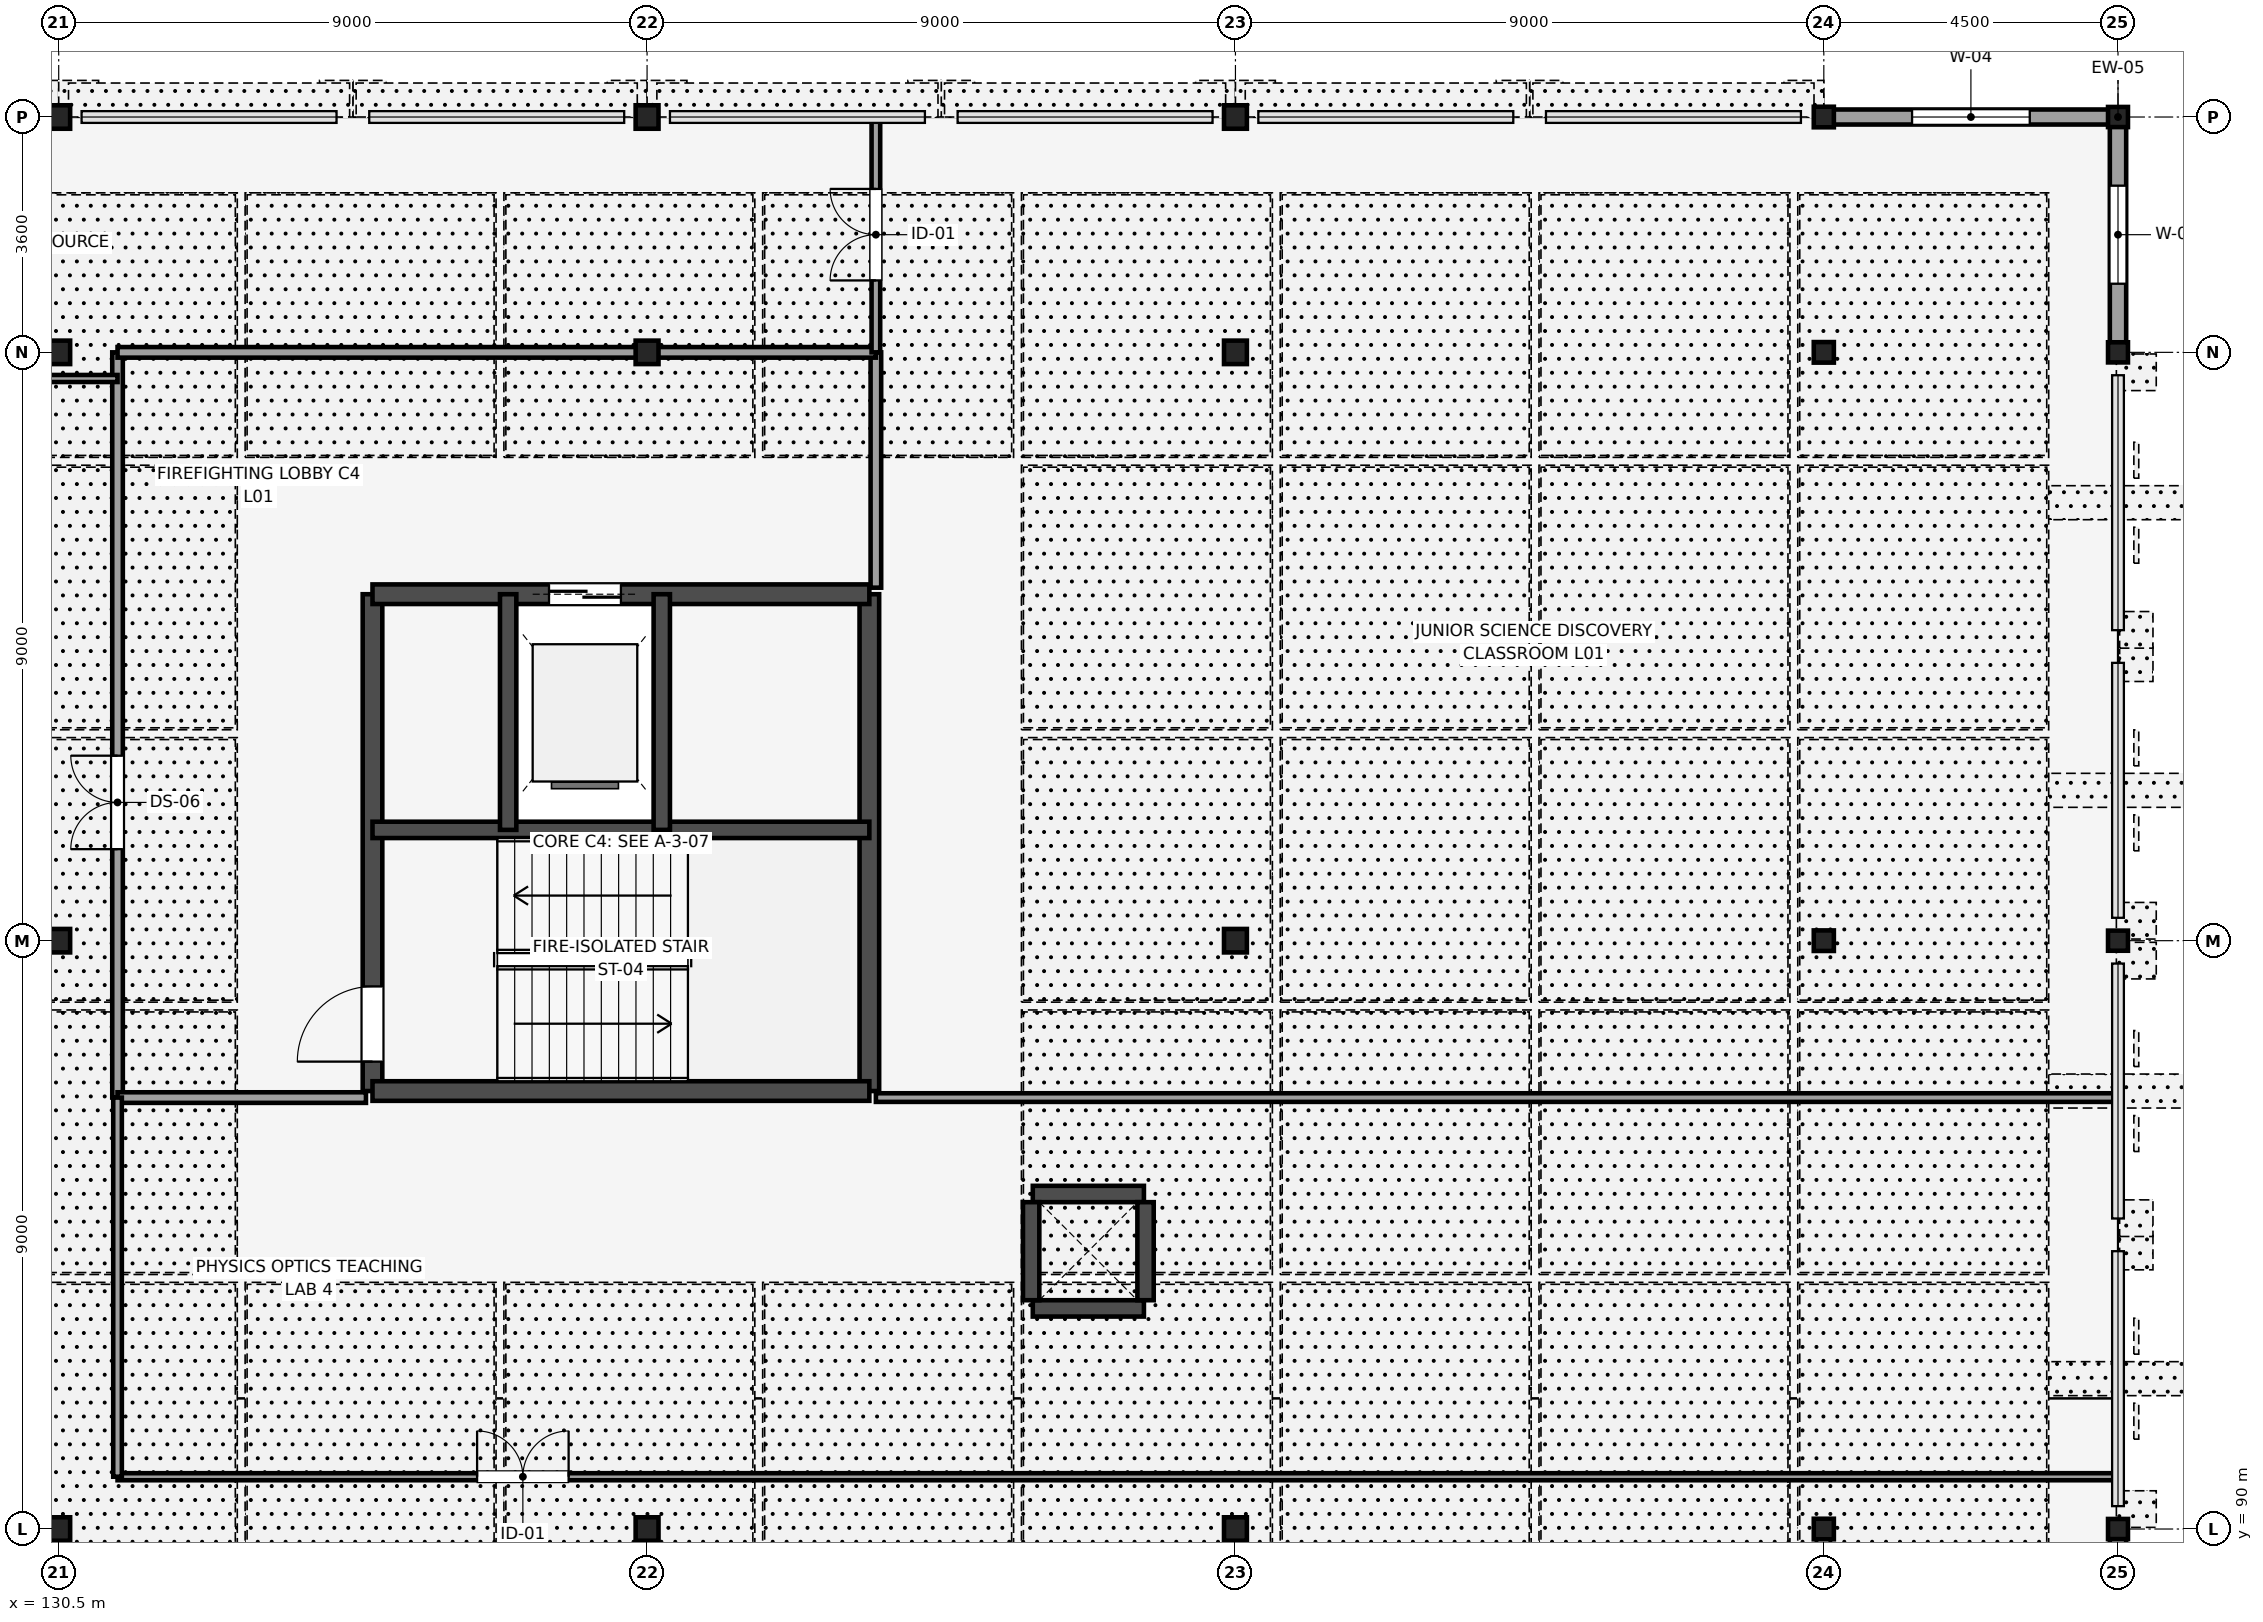
"""IFC4 building model, lengths in metres.
Left out: names, types, materials, properties, quantities, classifications, styles, units other than length and angle.
Written with IfcOpenShell. Run it as: python <this file> out.ifc"""

import sys

from ifc_helpers import new_model, si_unit, direction, frame, frame_2d, origin, origin_2d, place, context, subcontext, project, spatial, rectangle, i_section, extrude, element, fill, save


model = new_model("IFC4")
c1 = context("Model", 3, precision=1e-05, world=origin(), true_north=direction((0.0, 1.0)))
c2 = subcontext(c1, "Body", "Model", "MODEL_VIEW")
j1 = project(units=[si_unit("LENGTHUNIT", "METRE"), si_unit("PLANEANGLEUNIT", "RADIAN")], contexts=[c1])
p1 = place(None, origin())
s1 = spatial("IfcSite", under=j1, at=p1, CompositionType="ELEMENT")
p2 = place(p1, origin())
s2 = spatial("IfcBuilding", under=s1, at=p2, CompositionType="ELEMENT")
p3 = place(p2, frame((0.0, 0.0, 5.4)))
s3 = spatial("IfcBuildingStorey", under=s2, at=p3, CompositionType="ELEMENT", Elevation=5.4)
for number, where, z_axis, x_axis in (
    (1, (130.5, 90.0, 0.0), (0.0, 0.0, 1.0), (1.0, 0.0, 0.0)),
    (2, (130.5, 99.0, 0.0), (0.0, 0.0, 1.0), (1.0, 0.0, 0.0)),
    (3, (130.5, 108.0, 0.0), (0.0, 0.0, 1.0), (1.0, 0.0, 0.0)),
    (4, (130.5, 111.6, 0.0), (0.0, 0.0, 1.0), (1.0, 0.0, 0.0)),
    (5, (139.5, 90.0, 0.0), (0.0, 0.0, 1.0), (1.0, 0.0, 0.0)),
    (6, (139.5, 108.0, 0.0), (0.0, 0.0, 1.0), (1.0, 0.0, 0.0)),
    (7, (139.5, 111.6, 0.0), (0.0, 0.0, 1.0), (1.0, 0.0, 0.0)),
    (8, (148.5, 90.0, 0.0), (0.0, 0.0, 1.0), (1.0, 0.0, 0.0)),
    (9, (148.5, 99.0, 0.0), (0.0, 0.0, 1.0), (1.0, 0.0, 0.0)),
    (10, (148.5, 108.0, 0.0), (0.0, 0.0, 1.0), (1.0, 0.0, 0.0)),
    (11, (148.5, 111.6, 0.0), (0.0, 0.0, 1.0), (1.0, 0.0, 0.0)),
):
    element("IfcColumn", number, at=place(p3, frame(where, z_axis=z_axis, x_axis=x_axis)), inside=s3, PredefinedType="COLUMN", context=c2, shape_type="SweptSolid", body=[
        extrude(i_section(OverallWidth=0.35, OverallDepth=0.359, WebThickness=0.016, FlangeThickness=0.024, FilletRadius=0.014, at=origin_2d()), origin(), (0.0, 0.0, 1.0), 4.5),
    ])
for number, where, z_axis, x_axis in (
    (12, (157.5, 90.0, 0.0), (0.0, 0.0, 1.0), (1.0, 0.0, 0.0)),
    (13, (157.5, 99.0, 0.0), (0.0, 0.0, 1.0), (1.0, 0.0, 0.0)),
    (14, (157.5, 108.0, 0.0), (0.0, 0.0, 1.0), (1.0, 0.0, 0.0)),
    (15, (157.5, 111.6, 0.0), (0.0, 0.0, 1.0), (1.0, 0.0, 0.0)),
):
    element("IfcColumn", number, at=place(p3, frame(where, z_axis=z_axis, x_axis=x_axis)), inside=s3, PredefinedType="COLUMN", context=c2, shape_type="SweptSolid", body=[
        extrude(i_section(OverallWidth=0.307, OverallDepth=0.315, WebThickness=0.012, FlangeThickness=0.019, FilletRadius=0.017, at=origin_2d()), origin(), (0.0, 0.0, 1.0), 4.5),
    ])
for number, where, z_axis, x_axis in (
    (16, (162.0, 90.0, 0.0), (0.0, 0.0, 1.0), (1.0, 0.0, 0.0)),
    (17, (162.0, 99.0, 0.0), (0.0, 0.0, 1.0), (1.0, 0.0, 0.0)),
    (18, (162.0, 108.0, 0.0), (0.0, 0.0, 1.0), (1.0, 0.0, 0.0)),
    (19, (162.0, 111.6, 0.0), (0.0, 0.0, 1.0), (1.0, 0.0, 0.0)),
):
    element("IfcColumn", number, at=place(p3, frame(where, z_axis=z_axis, x_axis=x_axis)), inside=s3, PredefinedType="COLUMN", context=c2, shape_type="SweptSolid", body=[
        extrude(i_section(OverallWidth=0.305, OverallDepth=0.308, WebThickness=0.01, FlangeThickness=0.015, FilletRadius=0.017, at=origin_2d()), origin(), (0.0, 0.0, 1.0), 4.5),
    ])
p4 = place(p3, frame((135.3, 96.7, 0.0), z_axis=(0.0, 0.0, 1.0), x_axis=(0.0, 1.0, 0.0)))
e20 = element("IfcWall", 20, at=p4, inside=s3, PredefinedType="SHEAR", context=c2, shape_type="SweptSolid", body=[
    extrude(rectangle(XDim=7.6, YDim=0.3, at=frame_2d((3.8, 0.0))), origin(), (0.0, 0.0, 1.0), 4.5),
])
p5 = place(p4, frame((0.45, 0.0, 0.0)))
e21 = element("IfcOpeningElement", 21, at=p5, cuts=e20, PredefinedType="OPENING", context=c2, shape_type="SweptSolid", body=[
    extrude(rectangle(XDim=1.15, YDim=2.15, at=frame_2d((0.575, 1.075))), frame((0.0, 0.16, 0.0), z_axis=(0.0, -1.0, 0.0), x_axis=(1.0, 0.0, 0.0)), (0.0, 0.0, 1.0), 0.32),
])
p6 = place(p3, frame((142.9, 96.7, 0.0), z_axis=(0.0, 0.0, 1.0), x_axis=(0.0, 1.0, 0.0)))
e22 = element("IfcWall", 22, at=p6, inside=s3, PredefinedType="SHEAR", context=c2, shape_type="SweptSolid", body=[
    extrude(rectangle(XDim=7.6, YDim=0.3, at=frame_2d((3.8, 0.0))), origin(), (0.0, 0.0, 1.0), 4.5),
])
p7 = place(p3, frame((135.3, 96.7, 0.0), z_axis=(0.0, 0.0, 1.0), x_axis=(1.0, 0.0, 0.0)))
e23 = element("IfcWall", 23, at=p7, inside=s3, PredefinedType="SHEAR", context=c2, shape_type="SweptSolid", body=[
    extrude(rectangle(XDim=7.6, YDim=0.3, at=frame_2d((3.8, 0.0))), origin(), (0.0, 0.0, 1.0), 4.5),
])
p8 = place(p3, frame((135.3, 104.3, 0.0), z_axis=(0.0, 0.0, 1.0), x_axis=(1.0, 0.0, 0.0)))
e24 = element("IfcWall", 24, at=p8, inside=s3, PredefinedType="SHEAR", context=c2, shape_type="SweptSolid", body=[
    extrude(rectangle(XDim=7.6, YDim=0.3, at=frame_2d((3.8, 0.0))), origin(), (0.0, 0.0, 1.0), 4.5),
])
p9 = place(p8, frame((2.7, 0.0, 0.0)))
e25 = element("IfcOpeningElement", 25, at=p9, cuts=e24, PredefinedType="OPENING", context=c2, shape_type="SweptSolid", body=[
    extrude(rectangle(XDim=1.1, YDim=2.2, at=frame_2d((0.55, 1.1))), frame((0.0, 0.16, 0.0), z_axis=(0.0, -1.0, 0.0), x_axis=(1.0, 0.0, 0.0)), (0.0, 0.0, 1.0), 0.32),
])
p10 = place(p3, frame((135.3, 100.695, 0.0), z_axis=(0.0, 0.0, 1.0), x_axis=(1.0, 0.0, 0.0)))
e26 = element("IfcWall", 26, at=p10, inside=s3, PredefinedType="SHEAR", context=c2, shape_type="SweptSolid", body=[
    extrude(rectangle(XDim=7.6, YDim=0.25, at=frame_2d((3.8, 0.0))), origin(), (0.0, 0.0, 1.0), 4.5),
])
for number, where, z_axis, x_axis in (
    (27, (137.375, 100.695, 0.0), (0.0, 0.0, 1.0), (0.0, 1.0, 0.0)),
    (28, (139.725, 100.695, 0.0), (0.0, 0.0, 1.0), (0.0, 1.0, 0.0)),
):
    element("IfcWall", number, at=place(p3, frame(where, z_axis=z_axis, x_axis=x_axis)), inside=s3, PredefinedType="SHEAR", context=c2, shape_type="SweptSolid", body=[
        extrude(rectangle(XDim=3.605, YDim=0.25, at=frame_2d((1.802, 0.0))), origin(), (0.0, 0.0, 1.0), 4.5),
    ])
for number, where, z_axis, x_axis in (
    (29, (145.4, 93.375, 0.0), (0.0, 0.0, 1.0), (1.0, 0.0, 0.0)),
    (30, (145.4, 95.125, 0.0), (0.0, 0.0, 1.0), (1.0, 0.0, 0.0)),
):
    element("IfcWall", number, at=place(p3, frame(where, z_axis=z_axis, x_axis=x_axis)), inside=s3, PredefinedType="SHEAR", context=c2, shape_type="SweptSolid", body=[
        extrude(rectangle(XDim=1.7, YDim=0.25, at=frame_2d((0.85, 0.0))), origin(), (0.0, 0.0, 1.0), 3.77),
    ])
for number, where, z_axis, x_axis in (
    (31, (145.375, 93.5, 0.0), (0.0, 0.0, 1.0), (0.0, 1.0, 0.0)),
    (32, (147.125, 93.5, 0.0), (0.0, 0.0, 1.0), (0.0, 1.0, 0.0)),
):
    element("IfcWall", number, at=place(p3, frame(where, z_axis=z_axis, x_axis=x_axis)), inside=s3, PredefinedType="SHEAR", context=c2, shape_type="SweptSolid", body=[
        extrude(rectangle(XDim=1.5, YDim=0.25, at=frame_2d((0.75, 0.0))), origin(), (0.0, 0.0, 1.0), 3.77),
    ])
p11 = place(p3, frame((162.0, 111.6, 0.0), z_axis=(0.0, 0.0, 1.0), x_axis=(-1.0, 0.0, 0.0)))
e33 = element("IfcWall", 33, at=p11, inside=s3, PredefinedType="STANDARD", context=c2, shape_type="SweptSolid", body=[
    extrude(rectangle(XDim=4.5, YDim=0.23, at=frame_2d((2.25, 0.0))), origin(), (0.0, 0.0, 1.0), 3.846),
])
p12 = place(p11, frame((1.35, 0.0, 0.9)))
e34 = element("IfcOpeningElement", 34, at=p12, cuts=e33, PredefinedType="OPENING", context=c2, shape_type="SweptSolid", body=[
    extrude(rectangle(XDim=1.8, YDim=2.1, at=frame_2d((0.9, 1.05))), frame((0.0, 0.125, 0.0), z_axis=(0.0, -1.0, 0.0), x_axis=(1.0, 0.0, 0.0)), (0.0, 0.0, 1.0), 0.25),
])
p13 = place(p3, frame((162.0, 81.0, 0.0), z_axis=(0.0, 0.0, 1.0), x_axis=(0.0, 1.0, 0.0)))
e35 = element("IfcWall", 35, at=p13, inside=s3, PredefinedType="STANDARD", context=c2, shape_type="SweptSolid", body=[
    extrude(rectangle(XDim=9.0, YDim=0.25, at=frame_2d((4.5, 0.0))), origin(), (0.0, 0.0, 1.0), 3.846),
])
p14 = place(p3, frame((162.0, 108.0, 0.0), z_axis=(0.0, 0.0, 1.0), x_axis=(0.0, 1.0, 0.0)))
e36 = element("IfcWall", 36, at=p14, inside=s3, PredefinedType="STANDARD", context=c2, shape_type="SweptSolid", body=[
    extrude(rectangle(XDim=3.6, YDim=0.25, at=frame_2d((1.8, 0.0))), origin(), (0.0, 0.0, 1.0), 3.846),
])
p15 = place(p14, frame((1.05, 0.0, 1.0)))
e37 = element("IfcOpeningElement", 37, at=p15, cuts=e36, PredefinedType="OPENING", context=c2, shape_type="SweptSolid", body=[
    extrude(rectangle(XDim=1.5, YDim=1.5, at=frame_2d((0.75, 0.75))), frame((0.0, 0.135, 0.0), z_axis=(0.0, -1.0, 0.0), x_axis=(1.0, 0.0, 0.0)), (0.0, 0.0, 1.0), 0.27),
])
p16 = place(p3, frame((131.4, 96.6, 0.0), z_axis=(0.0, 0.0, 1.0), x_axis=(0.0, 1.0, 0.0)))
e38 = element("IfcWall", 38, at=p16, inside=s3, PredefinedType="PARTITIONING", context=c2, shape_type="SweptSolid", body=[
    extrude(rectangle(XDim=11.4, YDim=0.162, at=frame_2d((5.7, 0.0))), origin(), (0.0, 0.0, 1.0), 4.32),
])
p17 = place(p16, frame((3.8, 0.0, 0.0)))
e39 = element("IfcOpeningElement", 39, at=p17, cuts=e38, PredefinedType="OPENING", context=c2, shape_type="SweptSolid", body=[
    extrude(rectangle(XDim=1.43, YDim=2.175, at=frame_2d((0.715, 1.087))), frame((0.0, 0.091, 0.0), z_axis=(0.0, -1.0, 0.0), x_axis=(1.0, 0.0, 0.0)), (0.0, 0.0, 1.0), 0.182),
])
p18 = place(p3, frame((131.4, 96.6, 0.0), z_axis=(0.0, 0.0, 1.0), x_axis=(1.0, 0.0, 0.0)))
e40 = element("IfcWall", 40, at=p18, inside=s3, PredefinedType="PARTITIONING", context=c2, shape_type="SweptSolid", body=[
    extrude(rectangle(XDim=3.8, YDim=0.162, at=frame_2d((1.9, 0.0))), origin(), (0.0, 0.0, 1.0), 4.32),
])
p19 = place(p3, frame((143.0, 104.4, 0.0), z_axis=(0.0, 0.0, 1.0), x_axis=(0.0, 1.0, 0.0)))
e41 = element("IfcWall", 41, at=p19, inside=s3, PredefinedType="PARTITIONING", context=c2, shape_type="SweptSolid", body=[
    extrude(rectangle(XDim=3.6, YDim=0.162, at=frame_2d((1.8, 0.0))), origin(), (0.0, 0.0, 1.0), 4.32),
])
p20 = place(p3, frame((131.4, 108.0, 0.0), z_axis=(0.0, 0.0, 1.0), x_axis=(1.0, 0.0, 0.0)))
e42 = element("IfcWall", 42, at=p20, inside=s3, PredefinedType="PARTITIONING", context=c2, shape_type="SweptSolid", body=[
    extrude(rectangle(XDim=11.6, YDim=0.162, at=frame_2d((5.8, 0.0))), origin(), (0.0, 0.0, 1.0), 3.846),
])
p21 = place(p3, frame((116.8, 107.6, 0.0), z_axis=(0.0, 0.0, 1.0), x_axis=(1.0, 0.0, 0.0)))
e43 = element("IfcWall", 43, at=p21, inside=s3, PredefinedType="PARTITIONING", context=c2, shape_type="SweptSolid", body=[
    extrude(rectangle(XDim=14.6, YDim=0.108, at=frame_2d((7.3, 0.0))), origin(), (0.0, 0.0, 1.0), 4.32),
])
p22 = place(p21, frame((5.8, 0.0, 0.0)))
e44 = element("IfcOpeningElement", 44, at=p22, cuts=e43, PredefinedType="OPENING", context=c2, shape_type="SweptSolid", body=[
    extrude(rectangle(XDim=0.95, YDim=2.15, at=frame_2d((0.475, 1.075))), frame((0.0, 0.064, 0.0), z_axis=(0.0, -1.0, 0.0), x_axis=(1.0, 0.0, 0.0)), (0.0, 0.0, 1.0), 0.128),
])
p23 = place(p3, frame((131.4, 90.8, 0.0), z_axis=(0.0, 0.0, 1.0), x_axis=(1.0, 0.0, 0.0)))
e45 = element("IfcWall", 45, at=p23, inside=s3, PredefinedType="PARTITIONING", context=c2, shape_type="SweptSolid", body=[
    extrude(rectangle(XDim=30.6, YDim=0.108, at=frame_2d((15.3, 0.0))), origin(), (0.0, 0.0, 1.0), 4.32),
])
p24 = place(p23, frame((5.5, 0.0, 0.0)))
e46 = element("IfcOpeningElement", 46, at=p24, cuts=e45, PredefinedType="OPENING", context=c2, shape_type="SweptSolid", body=[
    extrude(rectangle(XDim=1.4, YDim=2.2, at=frame_2d((0.7, 1.1))), frame((0.0, 0.064, 0.0), z_axis=(0.0, -1.0, 0.0), x_axis=(1.0, 0.0, 0.0)), (0.0, 0.0, 1.0), 0.128),
])
p25 = place(p3, frame((131.4, 90.8, 0.0), z_axis=(0.0, 0.0, 1.0), x_axis=(0.0, 1.0, 0.0)))
e47 = element("IfcWall", 47, at=p25, inside=s3, PredefinedType="PARTITIONING", context=c2, shape_type="SweptSolid", body=[
    extrude(rectangle(XDim=5.8, YDim=0.132, at=frame_2d((2.9, 0.0))), origin(), (0.0, 0.0, 1.0), 4.32),
])
p26 = place(p3, frame((143.0, 96.6, 0.0), z_axis=(0.0, 0.0, 1.0), x_axis=(1.0, 0.0, 0.0)))
e48 = element("IfcWall", 48, at=p26, inside=s3, PredefinedType="PARTITIONING", context=c2, shape_type="SweptSolid", body=[
    extrude(rectangle(XDim=19.0, YDim=0.132, at=frame_2d((9.5, 0.0))), origin(), (0.0, 0.0, 1.0), 4.32),
])
p27 = place(p3, frame((143.0, 108.0, 0.0), z_axis=(0.0, 0.0, 1.0), x_axis=(0.0, 1.0, 0.0)))
e49 = element("IfcWall", 49, at=p27, inside=s3, PredefinedType="PARTITIONING", context=c2, shape_type="SweptSolid", body=[
    extrude(rectangle(XDim=3.6, YDim=0.132, at=frame_2d((1.8, 0.0))), origin(), (0.0, 0.0, 1.0), 4.32),
])
p28 = place(p27, frame((1.1, 0.0, 0.0)))
e50 = element("IfcOpeningElement", 50, at=p28, cuts=e49, PredefinedType="OPENING", context=c2, shape_type="SweptSolid", body=[
    extrude(rectangle(XDim=1.4, YDim=2.2, at=frame_2d((0.7, 1.1))), frame((0.0, 0.076, 0.0), z_axis=(0.0, -1.0, 0.0), x_axis=(1.0, 0.0, 0.0)), (0.0, 0.0, 1.0), 0.152),
])
p29 = place(p12, origin())
e51 = element("IfcWindow", 51, at=p29, inside=s3, PartitioningType="SINGLE_PANEL", PredefinedType="WINDOW", context=c2, shape_type="SweptSolid", body=[
    extrude(rectangle(XDim=1.8, YDim=2.1, at=frame_2d((0.9, 1.05))), frame((0.0, 0.03, 0.0), z_axis=(0.0, -1.0, 0.0), x_axis=(1.0, 0.0, 0.0)), (0.0, 0.0, 1.0), 0.06),
])
fill(e34, e51)
p30 = place(p15, origin())
e52 = element("IfcWindow", 52, at=p30, inside=s3, PartitioningType="SINGLE_PANEL", PredefinedType="WINDOW", context=c2, shape_type="SweptSolid", body=[
    extrude(rectangle(XDim=1.5, YDim=1.5, at=frame_2d((0.75, 0.75))), frame((0.0, 0.03, 0.0), z_axis=(0.0, -1.0, 0.0), x_axis=(1.0, 0.0, 0.0)), (0.0, 0.0, 1.0), 0.06),
])
fill(e37, e52)
p31 = place(p5, origin())
e53 = element("IfcDoor", 53, at=p31, inside=s3, OperationType="SINGLE_SWING_LEFT", PredefinedType="DOOR", context=c2, shape_type="SweptSolid", body=[
    extrude(rectangle(XDim=1.15, YDim=2.15, at=frame_2d((0.575, 1.075))), frame((0.0, 0.025, 0.0), z_axis=(0.0, -1.0, 0.0), x_axis=(1.0, 0.0, 0.0)), (0.0, 0.0, 1.0), 0.05),
])
fill(e21, e53)
p32 = place(p9, origin())
e54 = element("IfcDoor", 54, at=p32, inside=s3, OperationType="DOUBLE_DOOR_SLIDING", PredefinedType="DOOR", context=c2, shape_type="SweptSolid", body=[
    extrude(rectangle(XDim=1.1, YDim=2.2, at=frame_2d((0.55, 1.1))), frame((0.0, 0.025, 0.0), z_axis=(0.0, -1.0, 0.0), x_axis=(1.0, 0.0, 0.0)), (0.0, 0.0, 1.0), 0.05),
])
fill(e25, e54)
p33 = place(p17, origin())
e55 = element("IfcDoor", 55, at=p33, inside=s3, OperationType="DOUBLE_DOOR_SINGLE_SWING", PredefinedType="DOOR", context=c2, shape_type="SweptSolid", body=[
    extrude(rectangle(XDim=1.43, YDim=2.175, at=frame_2d((0.715, 1.087))), frame((0.0, 0.025, 0.0), z_axis=(0.0, -1.0, 0.0), x_axis=(1.0, 0.0, 0.0)), (0.0, 0.0, 1.0), 0.05),
])
fill(e39, e55)
p34 = place(p24, origin())
e56 = element("IfcDoor", 56, at=p34, inside=s3, OperationType="DOUBLE_DOOR_SINGLE_SWING", PredefinedType="DOOR", context=c2, shape_type="SweptSolid", body=[
    extrude(rectangle(XDim=1.4, YDim=2.2, at=frame_2d((0.7, 1.1))), frame((0.0, 0.025, 0.0), z_axis=(0.0, -1.0, 0.0), x_axis=(1.0, 0.0, 0.0)), (0.0, 0.0, 1.0), 0.05),
])
fill(e46, e56)
p35 = place(p28, origin())
e57 = element("IfcDoor", 57, at=p35, inside=s3, OperationType="DOUBLE_DOOR_SINGLE_SWING", PredefinedType="DOOR", context=c2, shape_type="SweptSolid", body=[
    extrude(rectangle(XDim=1.4, YDim=2.2, at=frame_2d((0.7, 1.1))), frame((0.0, 0.025, 0.0), z_axis=(0.0, -1.0, 0.0), x_axis=(1.0, 0.0, 0.0)), (0.0, 0.0, 1.0), 0.05),
])
fill(e50, e57)
save(model, sys.argv[1])
